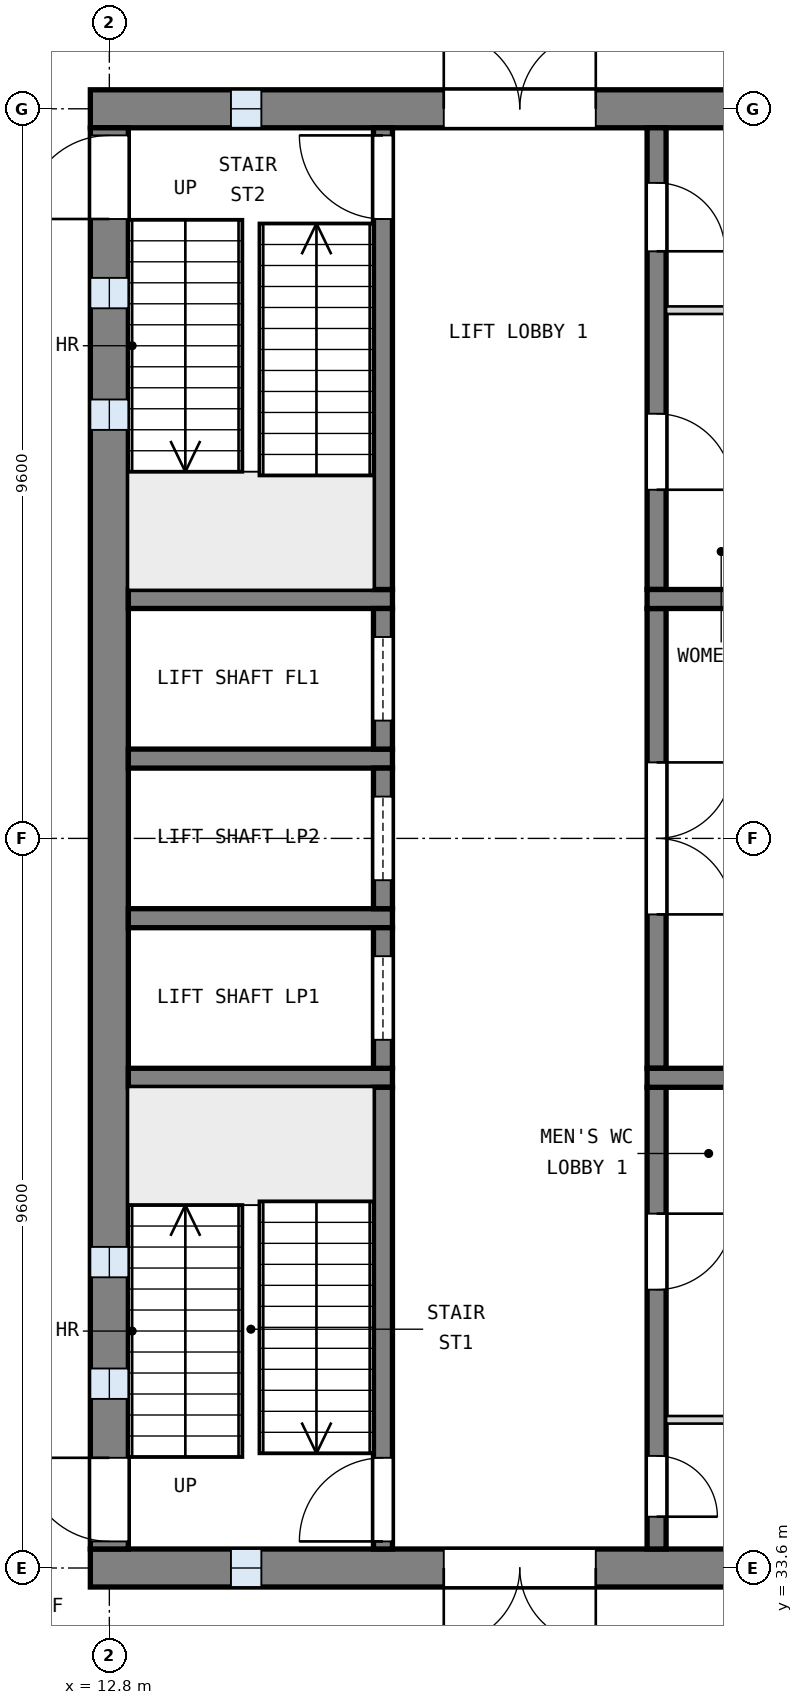
"""IFC4 building model, lengths in metres.
Left out: names, types, materials, properties, quantities, classifications, styles, units other than length and angle.
Written with IfcOpenShell. Run it as: python <this file> out.ifc"""

import sys

from ifc_helpers import new_model, si_unit, direction, frame, frame_2d, origin, place, context, subcontext, project, spatial, rectangle, extrude, element, fill, save


model = new_model("IFC4")
c1 = context("Model", 3, precision=1e-05, world=origin(), true_north=direction((0.0, 1.0)))
c2 = subcontext(c1, "Body", "Model", "MODEL_VIEW")
j1 = project(units=[si_unit("LENGTHUNIT", "METRE"), si_unit("PLANEANGLEUNIT", "RADIAN")], contexts=[c1])
p1 = place(None, origin())
s1 = spatial("IfcSite", under=j1, at=p1, CompositionType="ELEMENT")
p2 = place(p1, origin())
s2 = spatial("IfcBuilding", under=s1, at=p2, CompositionType="ELEMENT")
p3 = place(p2, frame((0.0, 0.0, 8.4)))
s3 = spatial("IfcBuildingStorey", under=s2, at=p3, CompositionType="ELEMENT", Elevation=8.4)
p4 = place(p3, frame((12.55, 52.8, 0.0), z_axis=(0.0, 0.0, 1.0), x_axis=(1.0, 0.0, 0.0)))
e1 = element("IfcWall", 1, at=p4, inside=s3, PredefinedType="SHEAR", context=c2, shape_type="SweptSolid", body=[
    extrude(rectangle(XDim=13.3, YDim=0.5, at=frame_2d((6.65, 0.0))), origin(), (0.0, 0.0, 1.0), 4.5),
])
p5 = place(p4, frame((1.85, 0.0, 1.0)))
e2 = element("IfcOpeningElement", 2, at=p5, cuts=e1, PredefinedType="OPENING", context=c2, shape_type="SweptSolid", body=[
    extrude(rectangle(XDim=0.4, YDim=2.0, at=frame_2d((0.2, 1.0))), frame((0.0, 0.26, 0.0), z_axis=(0.0, -1.0, 0.0), x_axis=(1.0, 0.0, 0.0)), (0.0, 0.0, 1.0), 0.52),
])
p6 = place(p4, frame((4.65, 0.0, 0.0)))
e3 = element("IfcOpeningElement", 3, at=p6, cuts=e1, PredefinedType="OPENING", context=c2, shape_type="SweptSolid", body=[
    extrude(rectangle(XDim=2.0, YDim=2.1, at=frame_2d((1.0, 1.05))), frame((0.0, 0.26, 0.0), z_axis=(0.0, -1.0, 0.0), x_axis=(1.0, 0.0, 0.0)), (0.0, 0.0, 1.0), 0.52),
])
p7 = place(p3, frame((12.55, 33.6, 0.0), z_axis=(0.0, 0.0, 1.0), x_axis=(1.0, 0.0, 0.0)))
e4 = element("IfcWall", 4, at=p7, inside=s3, PredefinedType="SHEAR", context=c2, shape_type="SweptSolid", body=[
    extrude(rectangle(XDim=13.3, YDim=0.5, at=frame_2d((6.65, 0.0))), origin(), (0.0, 0.0, 1.0), 4.5),
])
p8 = place(p7, frame((1.85, 0.0, 1.0)))
e5 = element("IfcOpeningElement", 5, at=p8, cuts=e4, PredefinedType="OPENING", context=c2, shape_type="SweptSolid", body=[
    extrude(rectangle(XDim=0.4, YDim=2.0, at=frame_2d((0.2, 1.0))), frame((0.0, 0.26, 0.0), z_axis=(0.0, -1.0, 0.0), x_axis=(1.0, 0.0, 0.0)), (0.0, 0.0, 1.0), 0.52),
])
p9 = place(p7, frame((4.65, 0.0, 0.0)))
e6 = element("IfcOpeningElement", 6, at=p9, cuts=e4, PredefinedType="OPENING", context=c2, shape_type="SweptSolid", body=[
    extrude(rectangle(XDim=2.0, YDim=2.1, at=frame_2d((1.0, 1.05))), frame((0.0, 0.26, 0.0), z_axis=(0.0, -1.0, 0.0), x_axis=(1.0, 0.0, 0.0)), (0.0, 0.0, 1.0), 0.52),
])
p10 = place(p3, frame((12.8, 33.85, 0.0), z_axis=(0.0, 0.0, 1.0), x_axis=(0.0, 1.0, 0.0)))
e7 = element("IfcWall", 7, at=p10, inside=s3, PredefinedType="SHEAR", context=c2, shape_type="SweptSolid", body=[
    extrude(rectangle(XDim=18.7, YDim=0.5, at=frame_2d((9.35, 0.0))), origin(), (0.0, 0.0, 1.0), 4.5),
])
p11 = place(p10, frame((1.975, 0.0, 1.0)))
e8 = element("IfcOpeningElement", 8, at=p11, cuts=e7, PredefinedType="OPENING", context=c2, shape_type="SweptSolid", body=[
    extrude(rectangle(XDim=0.4, YDim=2.0, at=frame_2d((0.2, 1.0))), frame((0.0, 0.26, 0.0), z_axis=(0.0, -1.0, 0.0), x_axis=(1.0, 0.0, 0.0)), (0.0, 0.0, 1.0), 0.52),
])
p12 = place(p10, frame((3.575, 0.0, 1.0)))
e9 = element("IfcOpeningElement", 9, at=p12, cuts=e7, PredefinedType="OPENING", context=c2, shape_type="SweptSolid", body=[
    extrude(rectangle(XDim=0.4, YDim=2.0, at=frame_2d((0.2, 1.0))), frame((0.0, 0.26, 0.0), z_axis=(0.0, -1.0, 0.0), x_axis=(1.0, 0.0, 0.0)), (0.0, 0.0, 1.0), 0.52),
])
p13 = place(p10, frame((14.725, 0.0, 1.0)))
e10 = element("IfcOpeningElement", 10, at=p13, cuts=e7, PredefinedType="OPENING", context=c2, shape_type="SweptSolid", body=[
    extrude(rectangle(XDim=0.4, YDim=2.0, at=frame_2d((0.2, 1.0))), frame((0.0, 0.26, 0.0), z_axis=(0.0, -1.0, 0.0), x_axis=(1.0, 0.0, 0.0)), (0.0, 0.0, 1.0), 0.52),
])
p14 = place(p10, frame((16.325, 0.0, 1.0)))
e11 = element("IfcOpeningElement", 11, at=p14, cuts=e7, PredefinedType="OPENING", context=c2, shape_type="SweptSolid", body=[
    extrude(rectangle(XDim=0.4, YDim=2.0, at=frame_2d((0.2, 1.0))), frame((0.0, 0.26, 0.0), z_axis=(0.0, -1.0, 0.0), x_axis=(1.0, 0.0, 0.0)), (0.0, 0.0, 1.0), 0.52),
])
p15 = place(p10, frame((0.1, 0.0, 0.0)))
e12 = element("IfcOpeningElement", 12, at=p15, cuts=e7, PredefinedType="OPENING", context=c2, shape_type="SweptSolid", body=[
    extrude(rectangle(XDim=1.1, YDim=2.1, at=frame_2d((0.55, 1.05))), frame((0.0, 0.26, 0.0), z_axis=(0.0, -1.0, 0.0), x_axis=(1.0, 0.0, 0.0)), (0.0, 0.0, 1.0), 0.52),
])
p16 = place(p10, frame((17.5, 0.0, 0.0)))
e13 = element("IfcOpeningElement", 13, at=p16, cuts=e7, PredefinedType="OPENING", context=c2, shape_type="SweptSolid", body=[
    extrude(rectangle(XDim=1.1, YDim=2.1, at=frame_2d((0.55, 1.05))), frame((0.0, 0.26, 0.0), z_axis=(0.0, -1.0, 0.0), x_axis=(1.0, 0.0, 0.0)), (0.0, 0.0, 1.0), 0.52),
])
for number, where, z_axis, x_axis in (
    (14, (13.05, 40.05, 0.0), (0.0, 0.0, 1.0), (1.0, 0.0, 0.0)),
    (15, (13.05, 42.15, 0.0), (0.0, 0.0, 1.0), (1.0, 0.0, 0.0)),
    (16, (13.05, 44.25, 0.0), (0.0, 0.0, 1.0), (1.0, 0.0, 0.0)),
    (17, (13.05, 46.35, 0.0), (0.0, 0.0, 1.0), (1.0, 0.0, 0.0)),
):
    element("IfcWall", number, at=place(p3, frame(where, z_axis=z_axis, x_axis=x_axis)), inside=s3, PredefinedType="SOLIDWALL", context=c2, shape_type="SweptSolid", body=[
        extrude(rectangle(XDim=3.475, YDim=0.25, at=frame_2d((1.737, 0.0))), origin(), (0.0, 0.0, 1.0), 4.2),
    ])
p17 = place(p3, frame((16.4, 33.85, 0.0), z_axis=(0.0, 0.0, 1.0), x_axis=(0.0, 1.0, 0.0)))
e18 = element("IfcWall", 18, at=p17, inside=s3, PredefinedType="SOLIDWALL", context=c2, shape_type="SweptSolid", body=[
    extrude(rectangle(XDim=6.075, YDim=0.25, at=frame_2d((3.038, 0.0))), origin(), (0.0, 0.0, 1.0), 4.2),
])
p18 = place(p17, frame((0.1, 0.0, 0.0)))
e19 = element("IfcOpeningElement", 19, at=p18, cuts=e18, PredefinedType="OPENING", context=c2, shape_type="SweptSolid", body=[
    extrude(rectangle(XDim=1.1, YDim=2.1, at=frame_2d((0.55, 1.05))), frame((0.0, 0.135, 0.0), z_axis=(0.0, -1.0, 0.0), x_axis=(1.0, 0.0, 0.0)), (0.0, 0.0, 1.0), 0.27),
])
p19 = place(p3, frame((16.4, 40.175, 0.0), z_axis=(0.0, 0.0, 1.0), x_axis=(0.0, 1.0, 0.0)))
e20 = element("IfcWall", 20, at=p19, inside=s3, PredefinedType="SOLIDWALL", context=c2, shape_type="SweptSolid", body=[
    extrude(rectangle(XDim=1.85, YDim=0.25, at=frame_2d((0.925, 0.0))), origin(), (0.0, 0.0, 1.0), 4.2),
])
p20 = place(p19, frame((0.375, 0.0, 0.0)))
e21 = element("IfcOpeningElement", 21, at=p20, cuts=e20, PredefinedType="OPENING", context=c2, shape_type="SweptSolid", body=[
    extrude(rectangle(XDim=1.1, YDim=2.1, at=frame_2d((0.55, 1.05))), frame((0.0, 0.135, 0.0), z_axis=(0.0, -1.0, 0.0), x_axis=(1.0, 0.0, 0.0)), (0.0, 0.0, 1.0), 0.27),
])
p21 = place(p3, frame((16.4, 42.275, 0.0), z_axis=(0.0, 0.0, 1.0), x_axis=(0.0, 1.0, 0.0)))
e22 = element("IfcWall", 22, at=p21, inside=s3, PredefinedType="SOLIDWALL", context=c2, shape_type="SweptSolid", body=[
    extrude(rectangle(XDim=1.85, YDim=0.25, at=frame_2d((0.925, 0.0))), origin(), (0.0, 0.0, 1.0), 4.2),
])
p22 = place(p21, frame((0.375, 0.0, 0.0)))
e23 = element("IfcOpeningElement", 23, at=p22, cuts=e22, PredefinedType="OPENING", context=c2, shape_type="SweptSolid", body=[
    extrude(rectangle(XDim=1.1, YDim=2.1, at=frame_2d((0.55, 1.05))), frame((0.0, 0.135, 0.0), z_axis=(0.0, -1.0, 0.0), x_axis=(1.0, 0.0, 0.0)), (0.0, 0.0, 1.0), 0.27),
])
p23 = place(p3, frame((16.4, 44.375, 0.0), z_axis=(0.0, 0.0, 1.0), x_axis=(0.0, 1.0, 0.0)))
e24 = element("IfcWall", 24, at=p23, inside=s3, PredefinedType="SOLIDWALL", context=c2, shape_type="SweptSolid", body=[
    extrude(rectangle(XDim=1.85, YDim=0.25, at=frame_2d((0.925, 0.0))), origin(), (0.0, 0.0, 1.0), 4.2),
])
p24 = place(p23, frame((0.375, 0.0, 0.0)))
e25 = element("IfcOpeningElement", 25, at=p24, cuts=e24, PredefinedType="OPENING", context=c2, shape_type="SweptSolid", body=[
    extrude(rectangle(XDim=1.1, YDim=2.1, at=frame_2d((0.55, 1.05))), frame((0.0, 0.135, 0.0), z_axis=(0.0, -1.0, 0.0), x_axis=(1.0, 0.0, 0.0)), (0.0, 0.0, 1.0), 0.27),
])
p25 = place(p3, frame((16.4, 46.475, 0.0), z_axis=(0.0, 0.0, 1.0), x_axis=(0.0, 1.0, 0.0)))
e26 = element("IfcWall", 26, at=p25, inside=s3, PredefinedType="SOLIDWALL", context=c2, shape_type="SweptSolid", body=[
    extrude(rectangle(XDim=6.075, YDim=0.25, at=frame_2d((3.038, 0.0))), origin(), (0.0, 0.0, 1.0), 4.2),
])
p26 = place(p25, frame((4.875, 0.0, 0.0)))
e27 = element("IfcOpeningElement", 27, at=p26, cuts=e26, PredefinedType="OPENING", context=c2, shape_type="SweptSolid", body=[
    extrude(rectangle(XDim=1.1, YDim=2.1, at=frame_2d((0.55, 1.05))), frame((0.0, 0.135, 0.0), z_axis=(0.0, -1.0, 0.0), x_axis=(1.0, 0.0, 0.0)), (0.0, 0.0, 1.0), 0.27),
])
p27 = place(p3, frame((20.0, 33.85, 0.0), z_axis=(0.0, 0.0, 1.0), x_axis=(0.0, 1.0, 0.0)))
e28 = element("IfcWall", 28, at=p27, inside=s3, PredefinedType="SOLIDWALL", context=c2, shape_type="SweptSolid", body=[
    extrude(rectangle(XDim=6.075, YDim=0.25, at=frame_2d((3.038, 0.0))), origin(), (0.0, 0.0, 1.0), 4.2),
])
p28 = place(p27, frame((0.425, 0.0, 0.0)))
e29 = element("IfcOpeningElement", 29, at=p28, cuts=e28, PredefinedType="OPENING", context=c2, shape_type="SweptSolid", body=[
    extrude(rectangle(XDim=0.8, YDim=2.1, at=frame_2d((0.4, 1.05))), frame((0.0, 0.135, 0.0), z_axis=(0.0, -1.0, 0.0), x_axis=(1.0, 0.0, 0.0)), (0.0, 0.0, 1.0), 0.27),
])
p29 = place(p27, frame((3.413, 0.0, 0.0)))
e30 = element("IfcOpeningElement", 30, at=p29, cuts=e28, PredefinedType="OPENING", context=c2, shape_type="SweptSolid", body=[
    extrude(rectangle(XDim=1.0, YDim=2.1, at=frame_2d((0.5, 1.05))), frame((0.0, 0.135, 0.0), z_axis=(0.0, -1.0, 0.0), x_axis=(1.0, 0.0, 0.0)), (0.0, 0.0, 1.0), 0.27),
])
p30 = place(p3, frame((20.0, 40.175, 0.0), z_axis=(0.0, 0.0, 1.0), x_axis=(0.0, 1.0, 0.0)))
e31 = element("IfcWall", 31, at=p30, inside=s3, PredefinedType="SOLIDWALL", context=c2, shape_type="SweptSolid", body=[
    extrude(rectangle(XDim=6.05, YDim=0.25, at=frame_2d((3.025, 0.0))), origin(), (0.0, 0.0, 1.0), 4.2),
])
p31 = place(p30, frame((2.025, 0.0, 0.0)))
e32 = element("IfcOpeningElement", 32, at=p31, cuts=e31, PredefinedType="OPENING", context=c2, shape_type="SweptSolid", body=[
    extrude(rectangle(XDim=2.0, YDim=2.1, at=frame_2d((1.0, 1.05))), frame((0.0, 0.135, 0.0), z_axis=(0.0, -1.0, 0.0), x_axis=(1.0, 0.0, 0.0)), (0.0, 0.0, 1.0), 0.27),
])
p32 = place(p3, frame((20.0, 46.475, 0.0), z_axis=(0.0, 0.0, 1.0), x_axis=(0.0, 1.0, 0.0)))
e33 = element("IfcWall", 33, at=p32, inside=s3, PredefinedType="SOLIDWALL", context=c2, shape_type="SweptSolid", body=[
    extrude(rectangle(XDim=6.075, YDim=0.25, at=frame_2d((3.038, 0.0))), origin(), (0.0, 0.0, 1.0), 4.2),
])
p33 = place(p32, frame((1.312, 0.0, 0.0)))
e34 = element("IfcOpeningElement", 34, at=p33, cuts=e33, PredefinedType="OPENING", context=c2, shape_type="SweptSolid", body=[
    extrude(rectangle(XDim=1.0, YDim=2.1, at=frame_2d((0.5, 1.05))), frame((0.0, 0.135, 0.0), z_axis=(0.0, -1.0, 0.0), x_axis=(1.0, 0.0, 0.0)), (0.0, 0.0, 1.0), 0.27),
])
p34 = place(p32, frame((4.45, 0.0, 0.0)))
e35 = element("IfcOpeningElement", 35, at=p34, cuts=e33, PredefinedType="OPENING", context=c2, shape_type="SweptSolid", body=[
    extrude(rectangle(XDim=0.9, YDim=2.1, at=frame_2d((0.45, 1.05))), frame((0.0, 0.135, 0.0), z_axis=(0.0, -1.0, 0.0), x_axis=(1.0, 0.0, 0.0)), (0.0, 0.0, 1.0), 0.27),
])
for number, where, z_axis, x_axis in (
    (36, (19.875, 40.05, 0.0), (0.0, 0.0, 1.0), (1.0, 0.0, 0.0)),
    (37, (19.875, 46.35, 0.0), (0.0, 0.0, 1.0), (1.0, 0.0, 0.0)),
):
    element("IfcWall", number, at=place(p3, frame(where, z_axis=z_axis, x_axis=x_axis)), inside=s3, PredefinedType="SOLIDWALL", context=c2, shape_type="SweptSolid", body=[
        extrude(rectangle(XDim=5.475, YDim=0.25, at=frame_2d((2.738, 0.0))), origin(), (0.0, 0.0, 1.0), 4.2),
    ])
for number, where, z_axis, x_axis in (
    (38, (20.125, 35.55, 0.0), (0.0, 0.0, 1.0), (1.0, 0.0, 0.0)),
    (39, (20.125, 50.15, 0.0), (0.0, 0.0, 1.0), (1.0, 0.0, 0.0)),
):
    element("IfcWall", number, at=place(p3, frame(where, z_axis=z_axis, x_axis=x_axis)), inside=s3, PredefinedType="PARTITIONING", context=c2, shape_type="SweptSolid", body=[
        extrude(rectangle(XDim=5.225, YDim=0.1, at=frame_2d((2.613, 0.0))), origin(), (0.0, 0.0, 1.0), 4.2),
    ])
p35 = place(p11, origin())
e40 = element("IfcWindow", 40, at=p35, inside=s3, PartitioningType="SINGLE_PANEL", PredefinedType="WINDOW", context=c2, shape_type="SweptSolid", body=[
    extrude(rectangle(XDim=0.4, YDim=2.0, at=frame_2d((0.2, 1.0))), frame((0.0, 0.03, 0.0), z_axis=(0.0, -1.0, 0.0), x_axis=(1.0, 0.0, 0.0)), (0.0, 0.0, 1.0), 0.06),
])
fill(e8, e40)
p36 = place(p12, origin())
e41 = element("IfcWindow", 41, at=p36, inside=s3, PartitioningType="SINGLE_PANEL", PredefinedType="WINDOW", context=c2, shape_type="SweptSolid", body=[
    extrude(rectangle(XDim=0.4, YDim=2.0, at=frame_2d((0.2, 1.0))), frame((0.0, 0.03, 0.0), z_axis=(0.0, -1.0, 0.0), x_axis=(1.0, 0.0, 0.0)), (0.0, 0.0, 1.0), 0.06),
])
fill(e9, e41)
p37 = place(p13, origin())
e42 = element("IfcWindow", 42, at=p37, inside=s3, PartitioningType="SINGLE_PANEL", PredefinedType="WINDOW", context=c2, shape_type="SweptSolid", body=[
    extrude(rectangle(XDim=0.4, YDim=2.0, at=frame_2d((0.2, 1.0))), frame((0.0, 0.03, 0.0), z_axis=(0.0, -1.0, 0.0), x_axis=(1.0, 0.0, 0.0)), (0.0, 0.0, 1.0), 0.06),
])
fill(e10, e42)
p38 = place(p14, origin())
e43 = element("IfcWindow", 43, at=p38, inside=s3, PartitioningType="SINGLE_PANEL", PredefinedType="WINDOW", context=c2, shape_type="SweptSolid", body=[
    extrude(rectangle(XDim=0.4, YDim=2.0, at=frame_2d((0.2, 1.0))), frame((0.0, 0.03, 0.0), z_axis=(0.0, -1.0, 0.0), x_axis=(1.0, 0.0, 0.0)), (0.0, 0.0, 1.0), 0.06),
])
fill(e11, e43)
p39 = place(p8, origin())
e44 = element("IfcWindow", 44, at=p39, inside=s3, PartitioningType="SINGLE_PANEL", PredefinedType="WINDOW", context=c2, shape_type="SweptSolid", body=[
    extrude(rectangle(XDim=0.4, YDim=2.0, at=frame_2d((0.2, 1.0))), frame((0.0, 0.03, 0.0), z_axis=(0.0, -1.0, 0.0), x_axis=(1.0, 0.0, 0.0)), (0.0, 0.0, 1.0), 0.06),
])
fill(e5, e44)
p40 = place(p5, origin())
e45 = element("IfcWindow", 45, at=p40, inside=s3, PartitioningType="SINGLE_PANEL", PredefinedType="WINDOW", context=c2, shape_type="SweptSolid", body=[
    extrude(rectangle(XDim=0.4, YDim=2.0, at=frame_2d((0.2, 1.0))), frame((0.0, 0.03, 0.0), z_axis=(0.0, -1.0, 0.0), x_axis=(1.0, 0.0, 0.0)), (0.0, 0.0, 1.0), 0.06),
])
fill(e2, e45)
p41 = place(p18, origin())
e46 = element("IfcDoor", 46, at=p41, inside=s3, OperationType="SINGLE_SWING_LEFT", PredefinedType="DOOR", context=c2, shape_type="SweptSolid", body=[
    extrude(rectangle(XDim=1.1, YDim=2.1, at=frame_2d((0.55, 1.05))), frame((0.0, 0.025, 0.0), z_axis=(0.0, -1.0, 0.0), x_axis=(1.0, 0.0, 0.0)), (0.0, 0.0, 1.0), 0.05),
])
fill(e19, e46)
p42 = place(p26, origin())
e47 = element("IfcDoor", 47, at=p42, inside=s3, OperationType="SINGLE_SWING_RIGHT", PredefinedType="DOOR", context=c2, shape_type="SweptSolid", body=[
    extrude(rectangle(XDim=1.1, YDim=2.1, at=frame_2d((0.55, 1.05))), frame((0.0, 0.025, 0.0), z_axis=(0.0, -1.0, 0.0), x_axis=(1.0, 0.0, 0.0)), (0.0, 0.0, 1.0), 0.05),
])
fill(e27, e47)
p43 = place(p20, origin())
e48 = element("IfcDoor", 48, at=p43, inside=s3, OperationType="SLIDING_TO_LEFT", PredefinedType="DOOR", context=c2, shape_type="SweptSolid", body=[
    extrude(rectangle(XDim=1.1, YDim=2.1, at=frame_2d((0.55, 1.05))), frame((0.0, 0.025, 0.0), z_axis=(0.0, -1.0, 0.0), x_axis=(1.0, 0.0, 0.0)), (0.0, 0.0, 1.0), 0.05),
])
fill(e21, e48)
p44 = place(p22, origin())
e49 = element("IfcDoor", 49, at=p44, inside=s3, OperationType="SLIDING_TO_LEFT", PredefinedType="DOOR", context=c2, shape_type="SweptSolid", body=[
    extrude(rectangle(XDim=1.1, YDim=2.1, at=frame_2d((0.55, 1.05))), frame((0.0, 0.025, 0.0), z_axis=(0.0, -1.0, 0.0), x_axis=(1.0, 0.0, 0.0)), (0.0, 0.0, 1.0), 0.05),
])
fill(e23, e49)
p45 = place(p24, origin())
e50 = element("IfcDoor", 50, at=p45, inside=s3, OperationType="SLIDING_TO_LEFT", PredefinedType="DOOR", context=c2, shape_type="SweptSolid", body=[
    extrude(rectangle(XDim=1.1, YDim=2.1, at=frame_2d((0.55, 1.05))), frame((0.0, 0.025, 0.0), z_axis=(0.0, -1.0, 0.0), x_axis=(1.0, 0.0, 0.0)), (0.0, 0.0, 1.0), 0.05),
])
fill(e25, e50)
p46 = place(p31, frame((2.0, 0.0, 0.0), z_axis=(0.0, 0.0, 1.0), x_axis=(-1.0, 0.0, 0.0)))
e51 = element("IfcDoor", 51, at=p46, inside=s3, OperationType="DOUBLE_DOOR_SINGLE_SWING", PredefinedType="DOOR", context=c2, shape_type="SweptSolid", body=[
    extrude(rectangle(XDim=2.0, YDim=2.1, at=frame_2d((1.0, 1.05))), frame((0.0, 0.025, 0.0), z_axis=(0.0, -1.0, 0.0), x_axis=(1.0, 0.0, 0.0)), (0.0, 0.0, 1.0), 0.05),
])
fill(e32, e51)
p47 = place(p28, frame((0.8, 0.0, 0.0), z_axis=(0.0, 0.0, 1.0), x_axis=(-1.0, 0.0, 0.0)))
e52 = element("IfcDoor", 52, at=p47, inside=s3, OperationType="SINGLE_SWING_RIGHT", PredefinedType="DOOR", context=c2, shape_type="SweptSolid", body=[
    extrude(rectangle(XDim=0.8, YDim=2.1, at=frame_2d((0.4, 1.05))), frame((0.0, 0.025, 0.0), z_axis=(0.0, -1.0, 0.0), x_axis=(1.0, 0.0, 0.0)), (0.0, 0.0, 1.0), 0.05),
])
fill(e29, e52)
p48 = place(p29, frame((1.0, 0.0, 0.0), z_axis=(0.0, 0.0, 1.0), x_axis=(-1.0, 0.0, 0.0)))
e53 = element("IfcDoor", 53, at=p48, inside=s3, OperationType="SINGLE_SWING_LEFT", PredefinedType="DOOR", context=c2, shape_type="SweptSolid", body=[
    extrude(rectangle(XDim=1.0, YDim=2.1, at=frame_2d((0.5, 1.05))), frame((0.0, 0.025, 0.0), z_axis=(0.0, -1.0, 0.0), x_axis=(1.0, 0.0, 0.0)), (0.0, 0.0, 1.0), 0.05),
])
fill(e30, e53)
p49 = place(p33, frame((1.0, 0.0, 0.0), z_axis=(0.0, 0.0, 1.0), x_axis=(-1.0, 0.0, 0.0)))
e54 = element("IfcDoor", 54, at=p49, inside=s3, OperationType="SINGLE_SWING_RIGHT", PredefinedType="DOOR", context=c2, shape_type="SweptSolid", body=[
    extrude(rectangle(XDim=1.0, YDim=2.1, at=frame_2d((0.5, 1.05))), frame((0.0, 0.025, 0.0), z_axis=(0.0, -1.0, 0.0), x_axis=(1.0, 0.0, 0.0)), (0.0, 0.0, 1.0), 0.05),
])
fill(e34, e54)
p50 = place(p34, frame((0.9, 0.0, 0.0), z_axis=(0.0, 0.0, 1.0), x_axis=(-1.0, 0.0, 0.0)))
e55 = element("IfcDoor", 55, at=p50, inside=s3, OperationType="SINGLE_SWING_RIGHT", PredefinedType="DOOR", context=c2, shape_type="SweptSolid", body=[
    extrude(rectangle(XDim=0.9, YDim=2.1, at=frame_2d((0.45, 1.05))), frame((0.0, 0.025, 0.0), z_axis=(0.0, -1.0, 0.0), x_axis=(1.0, 0.0, 0.0)), (0.0, 0.0, 1.0), 0.05),
])
fill(e35, e55)
p51 = place(p9, frame((2.0, 0.0, 0.0), z_axis=(0.0, 0.0, 1.0), x_axis=(-1.0, 0.0, 0.0)))
e56 = element("IfcDoor", 56, at=p51, inside=s3, OperationType="DOUBLE_DOOR_SINGLE_SWING", PredefinedType="DOOR", context=c2, shape_type="SweptSolid", body=[
    extrude(rectangle(XDim=2.0, YDim=2.1, at=frame_2d((1.0, 1.05))), frame((0.0, 0.025, 0.0), z_axis=(0.0, -1.0, 0.0), x_axis=(1.0, 0.0, 0.0)), (0.0, 0.0, 1.0), 0.05),
])
fill(e6, e56)
p52 = place(p6, origin())
e57 = element("IfcDoor", 57, at=p52, inside=s3, OperationType="DOUBLE_DOOR_SINGLE_SWING", PredefinedType="DOOR", context=c2, shape_type="SweptSolid", body=[
    extrude(rectangle(XDim=2.0, YDim=2.1, at=frame_2d((1.0, 1.05))), frame((0.0, 0.025, 0.0), z_axis=(0.0, -1.0, 0.0), x_axis=(1.0, 0.0, 0.0)), (0.0, 0.0, 1.0), 0.05),
])
fill(e3, e57)
p53 = place(p15, origin())
e58 = element("IfcDoor", 58, at=p53, inside=s3, OperationType="SINGLE_SWING_RIGHT", PredefinedType="DOOR", context=c2, shape_type="SweptSolid", body=[
    extrude(rectangle(XDim=1.1, YDim=2.1, at=frame_2d((0.55, 1.05))), frame((0.0, 0.025, 0.0), z_axis=(0.0, -1.0, 0.0), x_axis=(1.0, 0.0, 0.0)), (0.0, 0.0, 1.0), 0.05),
])
fill(e12, e58)
p54 = place(p16, origin())
e59 = element("IfcDoor", 59, at=p54, inside=s3, OperationType="SINGLE_SWING_LEFT", PredefinedType="DOOR", context=c2, shape_type="SweptSolid", body=[
    extrude(rectangle(XDim=1.1, YDim=2.1, at=frame_2d((0.55, 1.05))), frame((0.0, 0.025, 0.0), z_axis=(0.0, -1.0, 0.0), x_axis=(1.0, 0.0, 0.0)), (0.0, 0.0, 1.0), 0.05),
])
fill(e13, e59)
save(model, sys.argv[1])
